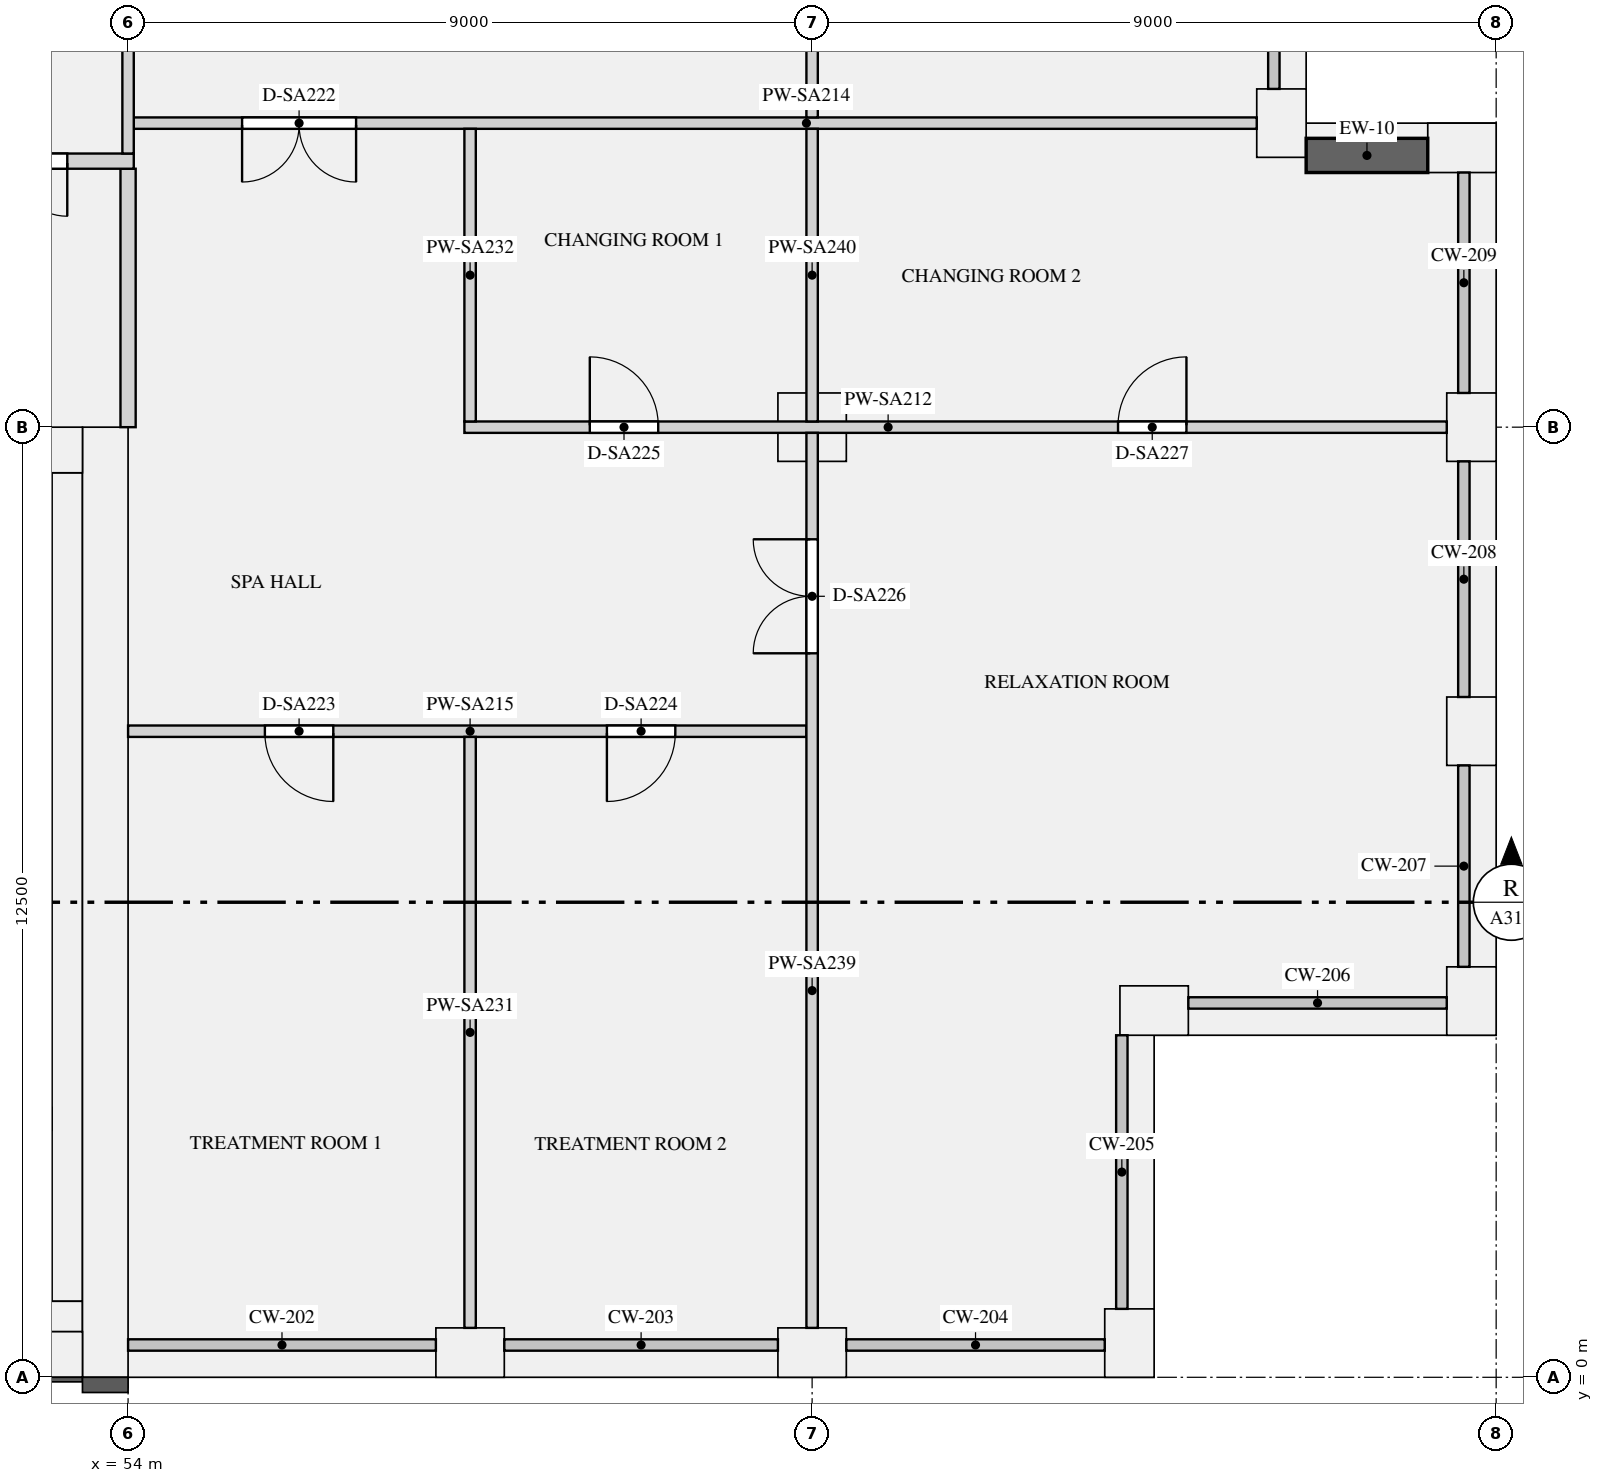
"""IFC4 building model, lengths in metres.
Left out: names, types, materials, properties, quantities, classifications, styles, units other than length and angle.
Written with IfcOpenShell. Run it as: python <this file> out.ifc"""

import sys

from ifc_helpers import new_model, si_unit, direction, frame, frame_2d, origin, origin_2d, place, context, subcontext, project, spatial, rectangle, extrude, element, fill, save


model = new_model("IFC4")
c1 = context("Model", 3, precision=1e-05, world=origin(), true_north=direction((0.0, 1.0)))
c2 = subcontext(c1, "Body", "Model", "MODEL_VIEW")
j1 = project(units=[si_unit("LENGTHUNIT", "METRE"), si_unit("PLANEANGLEUNIT", "RADIAN")], contexts=[c1])
p1 = place(None, origin())
s1 = spatial("IfcSite", under=j1, at=p1, CompositionType="ELEMENT")
p2 = place(p1, origin())
s2 = spatial("IfcBuilding", under=s1, at=p2, CompositionType="ELEMENT")
p3 = place(p2, frame((0.0, 0.0, 191.7)))
s3 = spatial("IfcBuildingStorey", under=s2, at=p3, CompositionType="ELEMENT", Elevation=191.7)
for number, where, z_axis, x_axis in (
    (1, (58.5, 0.325, 0.0), (0.0, 0.0, 1.0), (1.0, 0.0, 0.0)),
    (2, (63.0, 0.325, 0.0), (0.0, 0.0, 1.0), (1.0, 0.0, 0.0)),
    (3, (67.175, 0.45, 0.0), (0.0, 0.0, 1.0), (0.0, 1.0, 0.0)),
    (4, (67.5, 4.825, 0.0), (0.0, 0.0, 1.0), (1.0, 0.0, 0.0)),
    (5, (71.675, 4.95, 0.0), (0.0, 0.0, 1.0), (0.0, 1.0, 0.0)),
    (6, (71.675, 8.5, 0.0), (0.0, 0.0, 1.0), (0.0, 1.0, 0.0)),
    (7, (71.675, 12.5, 0.0), (0.0, 0.0, 1.0), (0.0, 1.0, 0.0)),
    (8, (71.55, 16.175, 0.0), (0.0, 0.0, 1.0), (-1.0, 0.0, 0.0)),
    (9, (69.175, 16.5, 0.0), (0.0, 0.0, 1.0), (0.0, 1.0, 0.0)),
):
    element("IfcColumn", number, at=place(p3, frame(where, z_axis=z_axis, x_axis=x_axis)), inside=s3, PredefinedType="USERDEFINED", context=c2, shape_type="SweptSolid", body=[
        extrude(rectangle(XDim=0.9, YDim=0.65, at=origin_2d()), origin(), (0.0, 0.0, 1.0), 6.3),
    ])
p4 = place(p3, frame((63.0, 12.5, 0.0), z_axis=(0.0, 0.0, 1.0), x_axis=(1.0, 0.0, 0.0)))
e10 = element("IfcColumn", 10, at=p4, inside=s3, PredefinedType="COLUMN", context=c2, shape_type="SweptSolid", body=[
    extrude(rectangle(XDim=0.9, YDim=0.9, at=origin_2d()), origin(), (0.0, 0.0, 1.0), 6.3),
])
p5 = place(p3, frame((53.7, 0.0, 0.0), z_axis=(0.0, 0.0, 1.0), x_axis=(0.0, 1.0, 0.0)))
e11 = element("IfcWall", 11, at=p5, inside=s3, PredefinedType="SHEAR", context=c2, shape_type="SweptSolid", body=[
    extrude(rectangle(XDim=12.5, YDim=0.6, at=frame_2d((6.25, 0.0))), origin(), (0.0, 0.0, 1.0), 6.3),
])
p6 = place(p3, frame((18.6, 0.3, 0.0), z_axis=(0.0, 0.0, 1.0), x_axis=(1.0, 0.0, 0.0)))
e12 = element("IfcWall", 12, at=p6, inside=s3, PredefinedType="SHEAR", context=c2, shape_type="SweptSolid", body=[
    extrude(rectangle(XDim=34.8, YDim=0.6, at=frame_2d((17.4, 0.0))), origin(), (0.0, 0.0, 1.0), 6.3),
])
p7 = place(p3, frame((18.6, 12.2, 0.0), z_axis=(0.0, 0.0, 1.0), x_axis=(1.0, 0.0, 0.0)))
e13 = element("IfcWall", 13, at=p7, inside=s3, PredefinedType="SHEAR", context=c2, shape_type="SweptSolid", body=[
    extrude(rectangle(XDim=34.8, YDim=0.6, at=frame_2d((17.4, 0.0))), origin(), (0.0, 0.0, 1.0), 6.3),
])
p8 = place(p7, frame((24.575, 0.0, 0.0)))
e14 = element("IfcOpeningElement", 14, at=p8, cuts=e13, PredefinedType="OPENING", context=c2, shape_type="SweptSolid", body=[
    extrude(rectangle(XDim=1.1, YDim=2.1, at=frame_2d((0.55, 1.05))), frame((0.0, 0.31, 0.0), z_axis=(0.0, -1.0, 0.0), x_axis=(1.0, 0.0, 0.0)), (0.0, 0.0, 1.0), 0.62),
])
p9 = place(p7, frame((26.825, 0.0, 0.0)))
e15 = element("IfcOpeningElement", 15, at=p9, cuts=e13, PredefinedType="OPENING", context=c2, shape_type="SweptSolid", body=[
    extrude(rectangle(XDim=1.1, YDim=2.1, at=frame_2d((0.55, 1.05))), frame((0.0, 0.31, 0.0), z_axis=(0.0, -1.0, 0.0), x_axis=(1.0, 0.0, 0.0)), (0.0, 0.0, 1.0), 0.62),
])
p10 = place(p7, frame((29.075, 0.0, 0.0)))
e16 = element("IfcOpeningElement", 16, at=p10, cuts=e13, PredefinedType="OPENING", context=c2, shape_type="SweptSolid", body=[
    extrude(rectangle(XDim=1.1, YDim=2.1, at=frame_2d((0.55, 1.05))), frame((0.0, 0.31, 0.0), z_axis=(0.0, -1.0, 0.0), x_axis=(1.0, 0.0, 0.0)), (0.0, 0.0, 1.0), 0.62),
])
p11 = place(p7, frame((4.65, 0.0, 0.0)))
e17 = element("IfcOpeningElement", 17, at=p11, cuts=e13, PredefinedType="OPENING", context=c2, shape_type="SweptSolid", body=[
    extrude(rectangle(XDim=0.9, YDim=2.1, at=frame_2d((0.45, 1.05))), frame((0.0, 0.31, 0.0), z_axis=(0.0, -1.0, 0.0), x_axis=(1.0, 0.0, 0.0)), (0.0, 0.0, 1.0), 0.62),
])
p12 = place(p7, frame((1.55, 0.0, 0.0)))
e18 = element("IfcOpeningElement", 18, at=p12, cuts=e13, PredefinedType="OPENING", context=c2, shape_type="SweptSolid", body=[
    extrude(rectangle(XDim=1.2, YDim=2.1, at=frame_2d((0.6, 1.05))), frame((0.0, 0.31, 0.0), z_axis=(0.0, -1.0, 0.0), x_axis=(1.0, 0.0, 0.0)), (0.0, 0.0, 1.0), 0.62),
])
p13 = place(p7, frame((32.05, 0.0, 0.0)))
e19 = element("IfcOpeningElement", 19, at=p13, cuts=e13, PredefinedType="OPENING", context=c2, shape_type="SweptSolid", body=[
    extrude(rectangle(XDim=1.2, YDim=2.1, at=frame_2d((0.6, 1.05))), frame((0.0, 0.31, 0.0), z_axis=(0.0, -1.0, 0.0), x_axis=(1.0, 0.0, 0.0)), (0.0, 0.0, 1.0), 0.62),
])
p14 = place(p3, frame((53.2, 1.0, 0.0), z_axis=(0.0, 0.0, 1.0), x_axis=(0.0, 1.0, 0.0)))
e20 = element("IfcWall", 20, at=p14, inside=s3, PredefinedType="SHEAR", context=c2, shape_type="SweptSolid", body=[
    extrude(rectangle(XDim=10.9, YDim=0.4, at=frame_2d((5.45, 0.0))), origin(), (0.0, 0.0, 1.0), 6.3),
])
p15 = place(p3, frame((18.6, 0.8, 0.0), z_axis=(0.0, 0.0, 1.0), x_axis=(1.0, 0.0, 0.0)))
e21 = element("IfcWall", 21, at=p15, inside=s3, PredefinedType="SHEAR", context=c2, shape_type="SweptSolid", body=[
    extrude(rectangle(XDim=34.8, YDim=0.4, at=frame_2d((17.4, 0.0))), origin(), (0.0, 0.0, 1.0), 6.3),
])
p16 = place(p3, frame((71.1, 16.075, 0.9), z_axis=(0.0, 0.0, 1.0), x_axis=(-1.0, 0.0, 0.0)))
e22 = element("IfcWall", 22, at=p16, inside=s3, PredefinedType="SOLIDWALL", context=c2, shape_type="SweptSolid", body=[
    extrude(rectangle(XDim=1.6, YDim=0.45, at=frame_2d((0.8, 0.0))), origin(), (0.0, 0.0, 1.0), 5.08),
])
p17 = place(p3, frame((54.0, 12.5, 0.0), z_axis=(0.0, 0.0, 1.0), x_axis=(0.0, 1.0, 0.0)))
e23 = element("IfcWall", 23, at=p17, inside=s3, PredefinedType="PARTITIONING", context=c2, shape_type="SweptSolid", body=[
    extrude(rectangle(XDim=3.4, YDim=0.2, at=frame_2d((1.7, 0.0))), origin(), (0.0, 0.0, 1.0), 5.98),
])
p18 = place(p3, frame((58.425, 12.5, 0.0), z_axis=(0.0, 0.0, 1.0), x_axis=(1.0, 0.0, 0.0)))
e24 = element("IfcWall", 24, at=p18, inside=s3, PredefinedType="PARTITIONING", context=c2, shape_type="SweptSolid", body=[
    extrude(rectangle(XDim=12.925, YDim=0.15, at=frame_2d((6.462, 0.0))), origin(), (0.0, 0.0, 1.0), 5.98),
])
p19 = place(p18, frame((1.65, 0.0, 0.0)))
e25 = element("IfcOpeningElement", 25, at=p19, cuts=e24, PredefinedType="OPENING", context=c2, shape_type="SweptSolid", body=[
    extrude(rectangle(XDim=0.9, YDim=2.1, at=frame_2d((0.45, 1.05))), frame((0.0, 0.085, 0.0), z_axis=(0.0, -1.0, 0.0), x_axis=(1.0, 0.0, 0.0)), (0.0, 0.0, 1.0), 0.17),
])
p20 = place(p18, frame((8.6, 0.0, 0.0)))
e26 = element("IfcOpeningElement", 26, at=p20, cuts=e24, PredefinedType="OPENING", context=c2, shape_type="SweptSolid", body=[
    extrude(rectangle(XDim=0.9, YDim=2.1, at=frame_2d((0.45, 1.05))), frame((0.0, 0.085, 0.0), z_axis=(0.0, -1.0, 0.0), x_axis=(1.0, 0.0, 0.0)), (0.0, 0.0, 1.0), 0.17),
])
p21 = place(p3, frame((54.075, 16.5, 0.0), z_axis=(0.0, 0.0, 1.0), x_axis=(1.0, 0.0, 0.0)))
e27 = element("IfcWall", 27, at=p21, inside=s3, PredefinedType="PARTITIONING", context=c2, shape_type="SweptSolid", body=[
    extrude(rectangle(XDim=14.775, YDim=0.15, at=frame_2d((7.388, 0.0))), origin(), (0.0, 0.0, 1.0), 5.98),
])
p22 = place(p21, frame((1.425, 0.0, 0.0)))
e28 = element("IfcOpeningElement", 28, at=p22, cuts=e27, PredefinedType="OPENING", context=c2, shape_type="SweptSolid", body=[
    extrude(rectangle(XDim=1.5, YDim=2.1, at=frame_2d((0.75, 1.05))), frame((0.0, 0.085, 0.0), z_axis=(0.0, -1.0, 0.0), x_axis=(1.0, 0.0, 0.0)), (0.0, 0.0, 1.0), 0.17),
])
p23 = place(p3, frame((54.0, 8.5, 0.0), z_axis=(0.0, 0.0, 1.0), x_axis=(1.0, 0.0, 0.0)))
e29 = element("IfcWall", 29, at=p23, inside=s3, PredefinedType="PARTITIONING", context=c2, shape_type="SweptSolid", body=[
    extrude(rectangle(XDim=8.925, YDim=0.15, at=frame_2d((4.462, 0.0))), origin(), (0.0, 0.0, 1.0), 5.98),
])
p24 = place(p23, frame((1.8, 0.0, 0.0)))
e30 = element("IfcOpeningElement", 30, at=p24, cuts=e29, PredefinedType="OPENING", context=c2, shape_type="SweptSolid", body=[
    extrude(rectangle(XDim=0.9, YDim=2.1, at=frame_2d((0.45, 1.05))), frame((0.0, 0.085, 0.0), z_axis=(0.0, -1.0, 0.0), x_axis=(1.0, 0.0, 0.0)), (0.0, 0.0, 1.0), 0.17),
])
p25 = place(p23, frame((6.3, 0.0, 0.0)))
e31 = element("IfcOpeningElement", 31, at=p25, cuts=e29, PredefinedType="OPENING", context=c2, shape_type="SweptSolid", body=[
    extrude(rectangle(XDim=0.9, YDim=2.1, at=frame_2d((0.45, 1.05))), frame((0.0, 0.085, 0.0), z_axis=(0.0, -1.0, 0.0), x_axis=(1.0, 0.0, 0.0)), (0.0, 0.0, 1.0), 0.17),
])
p26 = place(p3, frame((17.925, 16.0, 0.0), z_axis=(0.0, 0.0, 1.0), x_axis=(1.0, 0.0, 0.0)))
e32 = element("IfcWall", 32, at=p26, inside=s3, PredefinedType="PARTITIONING", context=c2, shape_type="SweptSolid", body=[
    extrude(rectangle(XDim=36.15, YDim=0.2, at=frame_2d((18.075, 0.0))), origin(), (0.0, 0.0, 1.0), 5.98),
])
p27 = place(p26, frame((0.875, 0.0, 0.0)))
e33 = element("IfcOpeningElement", 33, at=p27, cuts=e32, PredefinedType="OPENING", context=c2, shape_type="SweptSolid", body=[
    extrude(rectangle(XDim=1.4, YDim=2.1, at=frame_2d((0.7, 1.05))), frame((0.0, 0.11, 0.0), z_axis=(0.0, -1.0, 0.0), x_axis=(1.0, 0.0, 0.0)), (0.0, 0.0, 1.0), 0.22),
])
p28 = place(p26, frame((33.875, 0.0, 0.0)))
e34 = element("IfcOpeningElement", 34, at=p28, cuts=e32, PredefinedType="OPENING", context=c2, shape_type="SweptSolid", body=[
    extrude(rectangle(XDim=1.4, YDim=2.1, at=frame_2d((0.7, 1.05))), frame((0.0, 0.11, 0.0), z_axis=(0.0, -1.0, 0.0), x_axis=(1.0, 0.0, 0.0)), (0.0, 0.0, 1.0), 0.22),
])
p29 = place(p3, frame((54.0, 16.1, 0.0), z_axis=(0.0, 0.0, 1.0), x_axis=(0.0, 1.0, 0.0)))
e35 = element("IfcWall", 35, at=p29, inside=s3, PredefinedType="PARTITIONING", context=c2, shape_type="SweptSolid", body=[
    extrude(rectangle(XDim=7.825, YDim=0.15, at=frame_2d((3.913, 0.0))), origin(), (0.0, 0.0, 1.0), 5.98),
])
p30 = place(p29, frame((1.65, 0.0, 0.0)))
e36 = element("IfcOpeningElement", 36, at=p30, cuts=e35, PredefinedType="OPENING", context=c2, shape_type="SweptSolid", body=[
    extrude(rectangle(XDim=1.5, YDim=2.1, at=frame_2d((0.75, 1.05))), frame((0.0, 0.085, 0.0), z_axis=(0.0, -1.0, 0.0), x_axis=(1.0, 0.0, 0.0)), (0.0, 0.0, 1.0), 0.17),
])
p31 = place(p3, frame((58.5, 0.65, 0.0), z_axis=(0.0, 0.0, 1.0), x_axis=(0.0, 1.0, 0.0)))
e37 = element("IfcWall", 37, at=p31, inside=s3, PredefinedType="PARTITIONING", context=c2, shape_type="SweptSolid", body=[
    extrude(rectangle(XDim=7.775, YDim=0.15, at=frame_2d((3.888, 0.0))), origin(), (0.0, 0.0, 1.0), 5.98),
])
p32 = place(p3, frame((58.5, 12.575, 0.0), z_axis=(0.0, 0.0, 1.0), x_axis=(0.0, 1.0, 0.0)))
e38 = element("IfcWall", 38, at=p32, inside=s3, PredefinedType="PARTITIONING", context=c2, shape_type="SweptSolid", body=[
    extrude(rectangle(XDim=3.85, YDim=0.15, at=frame_2d((1.925, 0.0))), origin(), (0.0, 0.0, 1.0), 5.98),
])
p33 = place(p3, frame((63.0, 0.65, 0.0), z_axis=(0.0, 0.0, 1.0), x_axis=(0.0, 1.0, 0.0)))
e39 = element("IfcWall", 39, at=p33, inside=s3, PredefinedType="PARTITIONING", context=c2, shape_type="SweptSolid", body=[
    extrude(rectangle(XDim=11.775, YDim=0.15, at=frame_2d((5.888, 0.0))), origin(), (0.0, 0.0, 1.0), 5.98),
])
p34 = place(p33, frame((8.875, 0.0, 0.0)))
e40 = element("IfcOpeningElement", 40, at=p34, cuts=e39, PredefinedType="OPENING", context=c2, shape_type="SweptSolid", body=[
    extrude(rectangle(XDim=1.5, YDim=2.1, at=frame_2d((0.75, 1.05))), frame((0.0, 0.085, 0.0), z_axis=(0.0, -1.0, 0.0), x_axis=(1.0, 0.0, 0.0)), (0.0, 0.0, 1.0), 0.17),
])
p35 = place(p3, frame((63.0, 12.575, 0.0), z_axis=(0.0, 0.0, 1.0), x_axis=(0.0, 1.0, 0.0)))
e41 = element("IfcWall", 41, at=p35, inside=s3, PredefinedType="PARTITIONING", context=c2, shape_type="SweptSolid", body=[
    extrude(rectangle(XDim=3.85, YDim=0.15, at=frame_2d((1.925, 0.0))), origin(), (0.0, 0.0, 1.0), 5.98),
])
p36 = place(p3, frame((63.0, 16.575, 0.0), z_axis=(0.0, 0.0, 1.0), x_axis=(0.0, 1.0, 0.0)))
e42 = element("IfcWall", 42, at=p36, inside=s3, PredefinedType="PARTITIONING", context=c2, shape_type="SweptSolid", body=[
    extrude(rectangle(XDim=24.275, YDim=0.15, at=frame_2d((12.138, 0.0))), origin(), (0.0, 0.0, 1.0), 5.98),
])
p37 = place(p36, frame((2.7, 0.0, 0.0)))
e43 = element("IfcOpeningElement", 43, at=p37, cuts=e42, PredefinedType="OPENING", context=c2, shape_type="SweptSolid", body=[
    extrude(rectangle(XDim=1.5, YDim=2.1, at=frame_2d((0.75, 1.05))), frame((0.0, 0.085, 0.0), z_axis=(0.0, -1.0, 0.0), x_axis=(1.0, 0.0, 0.0)), (0.0, 0.0, 1.0), 0.17),
])
p38 = place(p36, frame((9.475, 0.0, 0.0)))
e44 = element("IfcOpeningElement", 44, at=p38, cuts=e42, PredefinedType="OPENING", context=c2, shape_type="SweptSolid", body=[
    extrude(rectangle(XDim=0.9, YDim=2.1, at=frame_2d((0.45, 1.05))), frame((0.0, 0.085, 0.0), z_axis=(0.0, -1.0, 0.0), x_axis=(1.0, 0.0, 0.0)), (0.0, 0.0, 1.0), 0.17),
])
p39 = place(p36, frame((13.6, 0.0, 0.0)))
e45 = element("IfcOpeningElement", 45, at=p39, cuts=e42, PredefinedType="OPENING", context=c2, shape_type="SweptSolid", body=[
    extrude(rectangle(XDim=0.9, YDim=2.1, at=frame_2d((0.45, 1.05))), frame((0.0, 0.085, 0.0), z_axis=(0.0, -1.0, 0.0), x_axis=(1.0, 0.0, 0.0)), (0.0, 0.0, 1.0), 0.17),
])
p40 = place(p36, frame((16.875, 0.0, 0.0)))
e46 = element("IfcOpeningElement", 46, at=p40, cuts=e42, PredefinedType="OPENING", context=c2, shape_type="SweptSolid", body=[
    extrude(rectangle(XDim=0.9, YDim=2.1, at=frame_2d((0.45, 1.05))), frame((0.0, 0.085, 0.0), z_axis=(0.0, -1.0, 0.0), x_axis=(1.0, 0.0, 0.0)), (0.0, 0.0, 1.0), 0.17),
])
p41 = place(p28, frame((1.4, 0.0, 0.0), z_axis=(0.0, 0.0, 1.0), x_axis=(-1.0, 0.0, 0.0)))
e47 = element("IfcDoor", 47, at=p41, inside=s3, OperationType="DOUBLE_DOOR_SINGLE_SWING", PredefinedType="DOOR", context=c2, shape_type="SweptSolid", body=[
    extrude(rectangle(XDim=1.4, YDim=2.1, at=frame_2d((0.7, 1.05))), frame((0.0, 0.025, 0.0), z_axis=(0.0, -1.0, 0.0), x_axis=(1.0, 0.0, 0.0)), (0.0, 0.0, 1.0), 0.05),
])
fill(e34, e47)
p42 = place(p22, frame((1.5, 0.0, 0.0), z_axis=(0.0, 0.0, 1.0), x_axis=(-1.0, 0.0, 0.0)))
e48 = element("IfcDoor", 48, at=p42, inside=s3, OperationType="DOUBLE_DOOR_SINGLE_SWING", PredefinedType="DOOR", context=c2, shape_type="SweptSolid", body=[
    extrude(rectangle(XDim=1.5, YDim=2.1, at=frame_2d((0.75, 1.05))), frame((0.0, 0.025, 0.0), z_axis=(0.0, -1.0, 0.0), x_axis=(1.0, 0.0, 0.0)), (0.0, 0.0, 1.0), 0.05),
])
fill(e28, e48)
p43 = place(p24, frame((0.9, 0.0, 0.0), z_axis=(0.0, 0.0, 1.0), x_axis=(-1.0, 0.0, 0.0)))
e49 = element("IfcDoor", 49, at=p43, inside=s3, OperationType="SINGLE_SWING_LEFT", PredefinedType="DOOR", context=c2, shape_type="SweptSolid", body=[
    extrude(rectangle(XDim=0.9, YDim=2.1, at=frame_2d((0.45, 1.05))), frame((0.0, 0.025, 0.0), z_axis=(0.0, -1.0, 0.0), x_axis=(1.0, 0.0, 0.0)), (0.0, 0.0, 1.0), 0.05),
])
fill(e30, e49)
p44 = place(p25, frame((0.9, 0.0, 0.0), z_axis=(0.0, 0.0, 1.0), x_axis=(-1.0, 0.0, 0.0)))
e50 = element("IfcDoor", 50, at=p44, inside=s3, OperationType="SINGLE_SWING_RIGHT", PredefinedType="DOOR", context=c2, shape_type="SweptSolid", body=[
    extrude(rectangle(XDim=0.9, YDim=2.1, at=frame_2d((0.45, 1.05))), frame((0.0, 0.025, 0.0), z_axis=(0.0, -1.0, 0.0), x_axis=(1.0, 0.0, 0.0)), (0.0, 0.0, 1.0), 0.05),
])
fill(e31, e50)
p45 = place(p19, origin())
e51 = element("IfcDoor", 51, at=p45, inside=s3, OperationType="SINGLE_SWING_LEFT", PredefinedType="DOOR", context=c2, shape_type="SweptSolid", body=[
    extrude(rectangle(XDim=0.9, YDim=2.1, at=frame_2d((0.45, 1.05))), frame((0.0, 0.025, 0.0), z_axis=(0.0, -1.0, 0.0), x_axis=(1.0, 0.0, 0.0)), (0.0, 0.0, 1.0), 0.05),
])
fill(e25, e51)
p46 = place(p34, origin())
e52 = element("IfcDoor", 52, at=p46, inside=s3, OperationType="DOUBLE_DOOR_SINGLE_SWING", PredefinedType="DOOR", context=c2, shape_type="SweptSolid", body=[
    extrude(rectangle(XDim=1.5, YDim=2.1, at=frame_2d((0.75, 1.05))), frame((0.0, 0.025, 0.0), z_axis=(0.0, -1.0, 0.0), x_axis=(1.0, 0.0, 0.0)), (0.0, 0.0, 1.0), 0.05),
])
fill(e40, e52)
p47 = place(p20, origin())
e53 = element("IfcDoor", 53, at=p47, inside=s3, OperationType="SINGLE_SWING_RIGHT", PredefinedType="DOOR", context=c2, shape_type="SweptSolid", body=[
    extrude(rectangle(XDim=0.9, YDim=2.1, at=frame_2d((0.45, 1.05))), frame((0.0, 0.025, 0.0), z_axis=(0.0, -1.0, 0.0), x_axis=(1.0, 0.0, 0.0)), (0.0, 0.0, 1.0), 0.05),
])
fill(e26, e53)
save(model, sys.argv[1])
